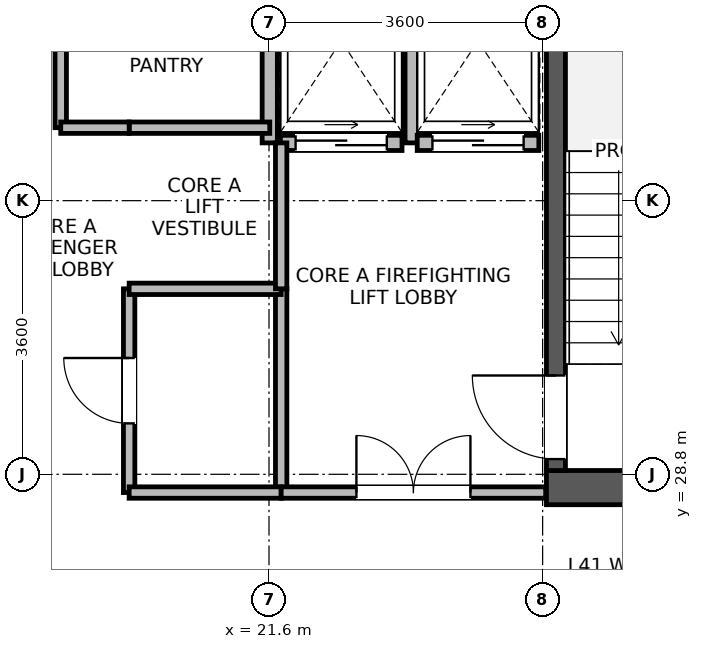
"""IFC4 building model, lengths in metres.
Left out: names, types, materials, properties, quantities, classifications, styles, units other than length and angle.
Written with IfcOpenShell. Run it as: python <this file> out.ifc"""

import sys

from ifc_helpers import new_model, si_unit, direction, frame, frame_2d, origin, place, context, subcontext, project, spatial, rectangle, extrude, element, fill, save


model = new_model("IFC4")
c1 = context("Model", 3, precision=1e-05, world=origin(), true_north=direction((0.0, 1.0)))
c2 = subcontext(c1, "Body", "Model", "MODEL_VIEW")
j1 = project(units=[si_unit("LENGTHUNIT", "METRE"), si_unit("PLANEANGLEUNIT", "RADIAN")], contexts=[c1])
p1 = place(None, origin())
s1 = spatial("IfcSite", under=j1, at=p1, CompositionType="ELEMENT")
p2 = place(p1, origin())
s2 = spatial("IfcBuilding", under=s1, at=p2, CompositionType="ELEMENT")
p3 = place(p2, frame((0.0, 0.0, 162.4)))
s3 = spatial("IfcBuildingStorey", under=s2, at=p3, CompositionType="ELEMENT", Elevation=162.4)
p4 = place(p3, frame((25.25, 28.625, 0.0), z_axis=(0.0, 0.0, 1.0), x_axis=(1.0, 0.0, 0.0)))
e1 = element("IfcWall", 1, at=p4, inside=s3, PredefinedType="SHEAR", context=c2, shape_type="SweptSolid", body=[
    extrude(rectangle(XDim=3.2, YDim=0.45, at=frame_2d((1.6, 0.0))), origin(), (0.0, 0.0, 1.0), 3.46),
])
p5 = place(p3, frame((25.375, 28.85, 0.0), z_axis=(0.0, 0.0, 1.0), x_axis=(0.0, 1.0, 0.0)))
e2 = element("IfcWall", 2, at=p5, inside=s3, PredefinedType="SHEAR", context=c2, shape_type="SweptSolid", body=[
    extrude(rectangle(XDim=7.0, YDim=0.25, at=frame_2d((3.5, 0.0))), origin(), (0.0, 0.0, 1.0), 3.46),
])
p6 = place(p5, frame((0.15, 0.0, 0.0)))
e3 = element("IfcOpeningElement", 3, at=p6, cuts=e2, PredefinedType="OPENING", context=c2, shape_type="SweptSolid", body=[
    extrude(rectangle(XDim=1.1, YDim=2.08, at=frame_2d((0.55, 1.04))), frame((0.0, 0.135, 0.0), z_axis=(0.0, -1.0, 0.0), x_axis=(1.0, 0.0, 0.0)), (0.0, 0.0, 1.0), 0.27),
])
p7 = place(p3, frame((21.75, 33.16, 0.0), z_axis=(0.0, 0.0, 1.0), x_axis=(1.0, 0.0, 0.0)))
e4 = element("IfcWall", 4, at=p7, inside=s3, PredefinedType="PARTITIONING", context=c2, shape_type="SweptSolid", body=[
    extrude(rectangle(XDim=1.6, YDim=0.2, at=frame_2d((0.8, 0.0))), origin(), (0.0, 0.0, 1.0), 3.44),
])
p8 = place(p7, frame((0.2, 0.0, 0.0)))
e5 = element("IfcOpeningElement", 5, at=p8, cuts=e4, PredefinedType="OPENING", context=c2, shape_type="SweptSolid", body=[
    extrude(rectangle(XDim=1.2, YDim=2.12, at=frame_2d((0.6, 1.06))), frame((0.0, 0.11, 0.0), z_axis=(0.0, -1.0, 0.0), x_axis=(1.0, 0.0, 0.0)), (0.0, 0.0, 1.0), 0.22),
])
for number, where, z_axis, x_axis in (
    (6, (21.61, 33.16, 0.0), (0.0, 0.0, 1.0), (0.0, 1.0, 0.0)),
    (7, (23.49, 33.16, 0.0), (0.0, 0.0, 1.0), (0.0, 1.0, 0.0)),
):
    element("IfcWall", number, at=place(p3, frame(where, z_axis=z_axis, x_axis=x_axis)), inside=s3, PredefinedType="PARTITIONING", context=c2, shape_type="SweptSolid", body=[
        extrude(rectangle(XDim=2.68, YDim=0.2, at=frame_2d((1.34, 0.0))), origin(), (0.0, 0.0, 1.0), 3.44),
    ])
p9 = place(p3, frame((23.55, 33.16, 0.0), z_axis=(0.0, 0.0, 1.0), x_axis=(1.0, 0.0, 0.0)))
e8 = element("IfcWall", 8, at=p9, inside=s3, PredefinedType="PARTITIONING", context=c2, shape_type="SweptSolid", body=[
    extrude(rectangle(XDim=1.6, YDim=0.2, at=frame_2d((0.8, 0.0))), origin(), (0.0, 0.0, 1.0), 3.44),
])
p10 = place(p9, frame((0.2, 0.0, 0.0)))
e9 = element("IfcOpeningElement", 9, at=p10, cuts=e8, PredefinedType="OPENING", context=c2, shape_type="SweptSolid", body=[
    extrude(rectangle(XDim=1.2, YDim=2.12, at=frame_2d((0.6, 1.06))), frame((0.0, 0.11, 0.0), z_axis=(0.0, -1.0, 0.0), x_axis=(1.0, 0.0, 0.0)), (0.0, 0.0, 1.0), 0.22),
])
p11 = place(p3, frame((18.86, 33.36, 0.0), z_axis=(0.0, 0.0, 1.0), x_axis=(0.0, 1.0, 0.0)))
e10 = element("IfcWall", 10, at=p11, inside=s3, PredefinedType="PARTITIONING", context=c2, shape_type="SweptSolid", body=[
    extrude(rectangle(XDim=2.88, YDim=0.15, at=frame_2d((1.44, 0.0))), origin(), (0.0, 0.0, 1.0), 3.44),
])
p12 = place(p3, frame((19.76, 28.56, 0.0), z_axis=(0.0, 0.0, 1.0), x_axis=(0.0, 1.0, 0.0)))
e11 = element("IfcWall", 11, at=p12, inside=s3, PredefinedType="PARTITIONING", context=c2, shape_type="SweptSolid", body=[
    extrude(rectangle(XDim=2.68, YDim=0.15, at=frame_2d((1.34, 0.0))), origin(), (0.0, 0.0, 1.0), 3.44),
])
p13 = place(p12, frame((0.91, 0.0, 0.0)))
e12 = element("IfcOpeningElement", 12, at=p13, cuts=e11, PredefinedType="OPENING", context=c2, shape_type="SweptSolid", body=[
    extrude(rectangle(XDim=0.86, YDim=2.02, at=frame_2d((0.43, 1.01))), frame((0.0, 0.085, 0.0), z_axis=(0.0, -1.0, 0.0), x_axis=(1.0, 0.0, 0.0)), (0.0, 0.0, 1.0), 0.17),
])
p14 = place(p3, frame((21.76, 28.56, 0.0), z_axis=(0.0, 0.0, 1.0), x_axis=(0.0, 1.0, 0.0)))
e13 = element("IfcWall", 13, at=p14, inside=s3, PredefinedType="PARTITIONING", context=c2, shape_type="SweptSolid", body=[
    extrude(rectangle(XDim=2.68, YDim=0.15, at=frame_2d((1.34, 0.0))), origin(), (0.0, 0.0, 1.0), 3.44),
])
p15 = place(p3, frame((19.76, 28.56, 0.0), z_axis=(0.0, 0.0, 1.0), x_axis=(1.0, 0.0, 0.0)))
e14 = element("IfcWall", 14, at=p15, inside=s3, PredefinedType="PARTITIONING", context=c2, shape_type="SweptSolid", body=[
    extrude(rectangle(XDim=2.0, YDim=0.15, at=frame_2d((1.0, 0.0))), origin(), (0.0, 0.0, 1.0), 2.44),
])
p16 = place(p3, frame((19.76, 31.24, 0.0), z_axis=(0.0, 0.0, 1.0), x_axis=(1.0, 0.0, 0.0)))
e15 = element("IfcWall", 15, at=p16, inside=s3, PredefinedType="PARTITIONING", context=c2, shape_type="SweptSolid", body=[
    extrude(rectangle(XDim=2.0, YDim=0.15, at=frame_2d((1.0, 0.0))), origin(), (0.0, 0.0, 1.0), 3.44),
])
p17 = place(p3, frame((19.76, 33.36, 0.0), z_axis=(0.0, 0.0, 1.0), x_axis=(1.0, 0.0, 0.0)))
e16 = element("IfcWall", 16, at=p17, inside=s3, PredefinedType="PARTITIONING", context=c2, shape_type="SweptSolid", body=[
    extrude(rectangle(XDim=1.85, YDim=0.15, at=frame_2d((0.925, 0.0))), origin(), (0.0, 0.0, 1.0), 3.44),
])
p18 = place(p3, frame((18.86, 33.36, 0.0), z_axis=(0.0, 0.0, 1.0), x_axis=(1.0, 0.0, 0.0)))
e17 = element("IfcWall", 17, at=p18, inside=s3, PredefinedType="PARTITIONING", context=c2, shape_type="SweptSolid", body=[
    extrude(rectangle(XDim=0.9, YDim=0.15, at=frame_2d((0.45, 0.0))), origin(), (0.0, 0.0, 1.0), 3.44),
])
p19 = place(p3, frame((21.76, 28.56, 0.0), z_axis=(0.0, 0.0, 1.0), x_axis=(1.0, 0.0, 0.0)))
e18 = element("IfcWall", 18, at=p19, inside=s3, PredefinedType="PARTITIONING", context=c2, shape_type="SweptSolid", body=[
    extrude(rectangle(XDim=3.48, YDim=0.15, at=frame_2d((1.74, 0.0))), origin(), (0.0, 0.0, 1.0), 2.44),
])
p20 = place(p19, frame((0.99, 0.0, 0.0)))
e19 = element("IfcOpeningElement", 19, at=p20, cuts=e18, PredefinedType="OPENING", context=c2, shape_type="SweptSolid", body=[
    extrude(rectangle(XDim=1.5, YDim=2.1, at=frame_2d((0.75, 1.05))), frame((0.0, 0.085, 0.0), z_axis=(0.0, -1.0, 0.0), x_axis=(1.0, 0.0, 0.0)), (0.0, 0.0, 1.0), 0.17),
])
p21 = place(p3, frame((21.76, 31.24, 0.0), z_axis=(0.0, 0.0, 1.0), x_axis=(0.0, 1.0, 0.0)))
e20 = element("IfcWall", 20, at=p21, inside=s3, PredefinedType="PARTITIONING", context=c2, shape_type="SweptSolid", body=[
    extrude(rectangle(XDim=1.92, YDim=0.15, at=frame_2d((0.96, 0.0))), origin(), (0.0, 0.0, 1.0), 3.44),
])
p22 = place(p6, origin())
e21 = element("IfcDoor", 21, at=p22, inside=s3, OperationType="SINGLE_SWING_RIGHT", PredefinedType="DOOR", context=c2, shape_type="SweptSolid", body=[
    extrude(rectangle(XDim=1.1, YDim=2.08, at=frame_2d((0.55, 1.04))), frame((0.0, 0.025, 0.0), z_axis=(0.0, -1.0, 0.0), x_axis=(1.0, 0.0, 0.0)), (0.0, 0.0, 1.0), 0.05),
])
fill(e3, e21)
p23 = place(p8, origin())
e22 = element("IfcDoor", 22, at=p23, inside=s3, OperationType="SLIDING_TO_RIGHT", PredefinedType="DOOR", context=c2, shape_type="SweptSolid", body=[
    extrude(rectangle(XDim=1.2, YDim=2.12, at=frame_2d((0.6, 1.06))), frame((0.0, 0.025, 0.0), z_axis=(0.0, -1.0, 0.0), x_axis=(1.0, 0.0, 0.0)), (0.0, 0.0, 1.0), 0.05),
])
fill(e5, e22)
p24 = place(p10, origin())
e23 = element("IfcDoor", 23, at=p24, inside=s3, OperationType="SLIDING_TO_RIGHT", PredefinedType="DOOR", context=c2, shape_type="SweptSolid", body=[
    extrude(rectangle(XDim=1.2, YDim=2.12, at=frame_2d((0.6, 1.06))), frame((0.0, 0.025, 0.0), z_axis=(0.0, -1.0, 0.0), x_axis=(1.0, 0.0, 0.0)), (0.0, 0.0, 1.0), 0.05),
])
fill(e9, e23)
p25 = place(p13, origin())
e24 = element("IfcDoor", 24, at=p25, inside=s3, OperationType="SINGLE_SWING_RIGHT", PredefinedType="DOOR", context=c2, shape_type="SweptSolid", body=[
    extrude(rectangle(XDim=0.86, YDim=2.02, at=frame_2d((0.43, 1.01))), frame((0.0, 0.025, 0.0), z_axis=(0.0, -1.0, 0.0), x_axis=(1.0, 0.0, 0.0)), (0.0, 0.0, 1.0), 0.05),
])
fill(e12, e24)
p26 = place(p20, origin())
e25 = element("IfcDoor", 25, at=p26, inside=s3, OperationType="DOUBLE_DOOR_SINGLE_SWING", PredefinedType="DOOR", context=c2, shape_type="SweptSolid", body=[
    extrude(rectangle(XDim=1.5, YDim=2.1, at=frame_2d((0.75, 1.05))), frame((0.0, 0.025, 0.0), z_axis=(0.0, -1.0, 0.0), x_axis=(1.0, 0.0, 0.0)), (0.0, 0.0, 1.0), 0.05),
])
fill(e19, e25)
save(model, sys.argv[1])
